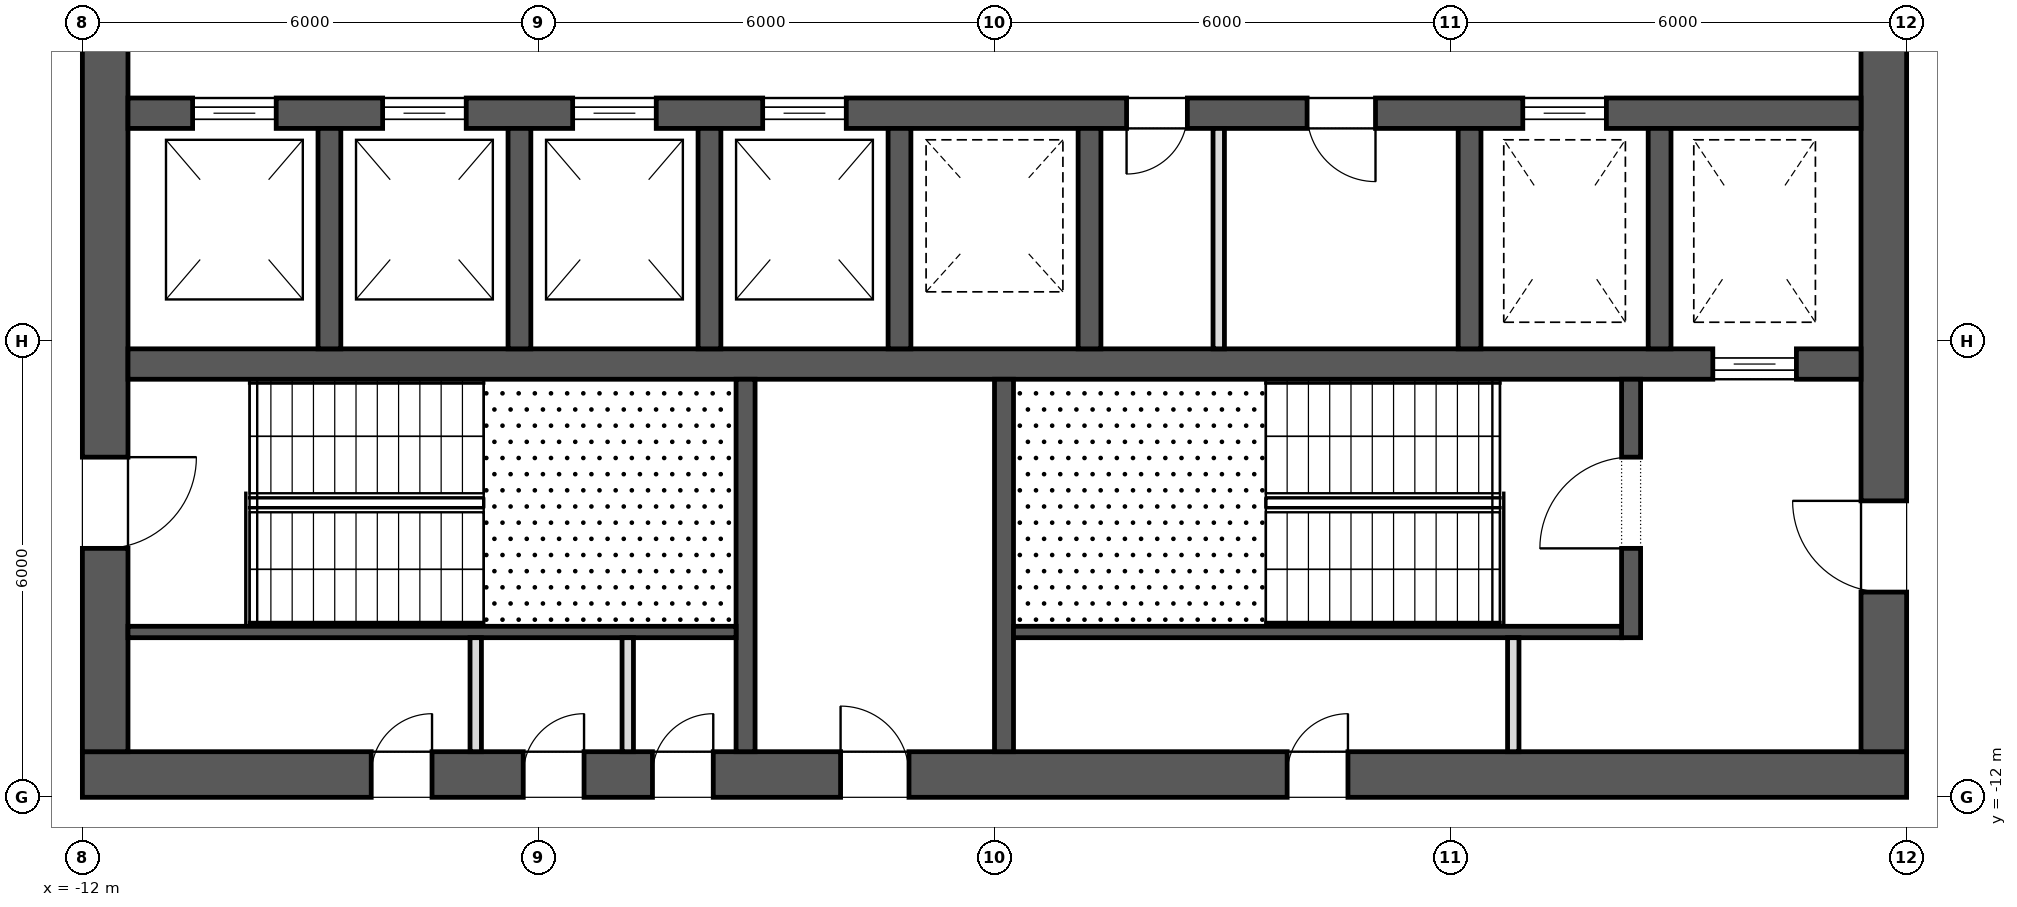
"""IFC4 building model, lengths in metres.
Left out: names, types, materials, properties, quantities, classifications, styles, units other than length and angle.
Written with IfcOpenShell. Run it as: python <this file> out.ifc"""

import sys

from ifc_helpers import new_model, si_unit, direction, frame, frame_2d, origin, place, context, subcontext, project, spatial, rectangle, extrude, element, fill, save


model = new_model("IFC4")
c1 = context("Model", 3, precision=1e-05, world=origin(), true_north=direction((0.0, 1.0)))
c2 = subcontext(c1, "Body", "Model", "MODEL_VIEW")
j1 = project(units=[si_unit("LENGTHUNIT", "METRE"), si_unit("PLANEANGLEUNIT", "RADIAN")], contexts=[c1])
p1 = place(None, origin())
s1 = spatial("IfcSite", under=j1, at=p1, CompositionType="ELEMENT")
p2 = place(p1, origin())
s2 = spatial("IfcBuilding", under=s1, at=p2, CompositionType="ELEMENT")
p3 = place(p2, frame((0.0, 0.0, 226.9)))
s3 = spatial("IfcBuildingStorey", under=s2, at=p3, CompositionType="ELEMENT", Elevation=226.9)
p4 = place(p3, frame((-12.0, -11.7, 0.0), z_axis=(0.0, 0.0, 1.0), x_axis=(1.0, 0.0, 0.0)))
e1 = element("IfcWall", 1, at=p4, inside=s3, PredefinedType="SHEAR", context=c2, shape_type="SweptSolid", body=[
    extrude(rectangle(XDim=24.0, YDim=0.6, at=frame_2d((12.0, 0.0))), origin(), (0.0, 0.0, 1.0), 4.0),
])
p5 = place(p4, frame((9.975, 0.0, 0.0)))
e2 = element("IfcOpeningElement", 2, at=p5, cuts=e1, PredefinedType="OPENING", context=c2, shape_type="SweptSolid", body=[
    extrude(rectangle(XDim=0.9, YDim=2.1, at=frame_2d((0.45, 1.05))), frame((0.0, 0.312, 0.0), z_axis=(0.0, -1.0, 0.0), x_axis=(1.0, 0.0, 0.0)), (0.0, 0.0, 1.0), 0.624),
])
p6 = place(p4, frame((3.8, 0.0, 0.0)))
e3 = element("IfcOpeningElement", 3, at=p6, cuts=e1, PredefinedType="OPENING", context=c2, shape_type="SweptSolid", body=[
    extrude(rectangle(XDim=0.8, YDim=2.1, at=frame_2d((0.4, 1.05))), frame((0.0, 0.312, 0.0), z_axis=(0.0, -1.0, 0.0), x_axis=(1.0, 0.0, 0.0)), (0.0, 0.0, 1.0), 0.624),
])
p7 = place(p4, frame((5.8, 0.0, 0.0)))
e4 = element("IfcOpeningElement", 4, at=p7, cuts=e1, PredefinedType="OPENING", context=c2, shape_type="SweptSolid", body=[
    extrude(rectangle(XDim=0.8, YDim=2.1, at=frame_2d((0.4, 1.05))), frame((0.0, 0.312, 0.0), z_axis=(0.0, -1.0, 0.0), x_axis=(1.0, 0.0, 0.0)), (0.0, 0.0, 1.0), 0.624),
])
p8 = place(p4, frame((7.5, 0.0, 0.0)))
e5 = element("IfcOpeningElement", 5, at=p8, cuts=e1, PredefinedType="OPENING", context=c2, shape_type="SweptSolid", body=[
    extrude(rectangle(XDim=0.8, YDim=2.1, at=frame_2d((0.4, 1.05))), frame((0.0, 0.312, 0.0), z_axis=(0.0, -1.0, 0.0), x_axis=(1.0, 0.0, 0.0)), (0.0, 0.0, 1.0), 0.624),
])
p9 = place(p4, frame((15.85, 0.0, 0.0)))
e6 = element("IfcOpeningElement", 6, at=p9, cuts=e1, PredefinedType="OPENING", context=c2, shape_type="SweptSolid", body=[
    extrude(rectangle(XDim=0.8, YDim=2.1, at=frame_2d((0.4, 1.05))), frame((0.0, 0.312, 0.0), z_axis=(0.0, -1.0, 0.0), x_axis=(1.0, 0.0, 0.0)), (0.0, 0.0, 1.0), 0.624),
])
p10 = place(p3, frame((11.7, -11.4, 0.0), z_axis=(0.0, 0.0, 1.0), x_axis=(0.0, 1.0, 0.0)))
e7 = element("IfcWall", 7, at=p10, inside=s3, PredefinedType="SHEAR", context=c2, shape_type="SweptSolid", body=[
    extrude(rectangle(XDim=22.8, YDim=0.6, at=frame_2d((11.4, 0.0))), origin(), (0.0, 0.0, 1.0), 4.0),
])
p11 = place(p10, frame((10.2, 0.0, 0.0)))
e8 = element("IfcOpeningElement", 8, at=p11, cuts=e7, PredefinedType="OPENING", context=c2, shape_type="SweptSolid", body=[
    extrude(rectangle(XDim=2.4, YDim=2.1, at=frame_2d((1.2, 1.05))), frame((0.0, 0.312, 0.0), z_axis=(0.0, -1.0, 0.0), x_axis=(1.0, 0.0, 0.0)), (0.0, 0.0, 1.0), 0.624),
])
p12 = place(p10, frame((19.5, 0.0, 0.0)))
e9 = element("IfcOpeningElement", 9, at=p12, cuts=e7, PredefinedType="OPENING", context=c2, shape_type="SweptSolid", body=[
    extrude(rectangle(XDim=1.2, YDim=2.1, at=frame_2d((0.6, 1.05))), frame((0.0, 0.312, 0.0), z_axis=(0.0, -1.0, 0.0), x_axis=(1.0, 0.0, 0.0)), (0.0, 0.0, 1.0), 0.624),
])
p13 = place(p10, frame((2.1, 0.0, 0.0)))
e10 = element("IfcOpeningElement", 10, at=p13, cuts=e7, PredefinedType="OPENING", context=c2, shape_type="SweptSolid", body=[
    extrude(rectangle(XDim=1.2, YDim=2.1, at=frame_2d((0.6, 1.05))), frame((0.0, 0.312, 0.0), z_axis=(0.0, -1.0, 0.0), x_axis=(1.0, 0.0, 0.0)), (0.0, 0.0, 1.0), 0.624),
])
p14 = place(p3, frame((-11.7, -11.4, 0.0), z_axis=(0.0, 0.0, 1.0), x_axis=(0.0, 1.0, 0.0)))
e11 = element("IfcWall", 11, at=p14, inside=s3, PredefinedType="SHEAR", context=c2, shape_type="SweptSolid", body=[
    extrude(rectangle(XDim=22.8, YDim=0.6, at=frame_2d((11.4, 0.0))), origin(), (0.0, 0.0, 1.0), 4.0),
])
p15 = place(p14, frame((10.2, 0.0, 0.0)))
e12 = element("IfcOpeningElement", 12, at=p15, cuts=e11, PredefinedType="OPENING", context=c2, shape_type="SweptSolid", body=[
    extrude(rectangle(XDim=2.4, YDim=2.1, at=frame_2d((1.2, 1.05))), frame((0.0, 0.312, 0.0), z_axis=(0.0, -1.0, 0.0), x_axis=(1.0, 0.0, 0.0)), (0.0, 0.0, 1.0), 0.624),
])
p16 = place(p14, frame((18.925, 0.0, 0.0)))
e13 = element("IfcOpeningElement", 13, at=p16, cuts=e11, PredefinedType="OPENING", context=c2, shape_type="SweptSolid", body=[
    extrude(rectangle(XDim=1.2, YDim=2.1, at=frame_2d((0.6, 1.05))), frame((0.0, 0.312, 0.0), z_axis=(0.0, -1.0, 0.0), x_axis=(1.0, 0.0, 0.0)), (0.0, 0.0, 1.0), 0.624),
])
p17 = place(p14, frame((2.675, 0.0, 0.0)))
e14 = element("IfcOpeningElement", 14, at=p17, cuts=e11, PredefinedType="OPENING", context=c2, shape_type="SweptSolid", body=[
    extrude(rectangle(XDim=1.2, YDim=2.1, at=frame_2d((0.6, 1.05))), frame((0.0, 0.312, 0.0), z_axis=(0.0, -1.0, 0.0), x_axis=(1.0, 0.0, 0.0)), (0.0, 0.0, 1.0), 0.624),
])
p18 = place(p3, frame((-11.4, -3.0, 0.0), z_axis=(0.0, 0.0, 1.0), x_axis=(1.0, 0.0, 0.0)))
e15 = element("IfcWall", 15, at=p18, inside=s3, PredefinedType="SHEAR", context=c2, shape_type="SweptSolid", body=[
    extrude(rectangle(XDim=22.8, YDim=0.4, at=frame_2d((11.4, 0.0))), origin(), (0.0, 0.0, 1.0), 4.0),
])
p19 = place(p18, frame((0.85, 0.0, 0.0)))
e16 = element("IfcOpeningElement", 16, at=p19, cuts=e15, PredefinedType="OPENING", context=c2, shape_type="SweptSolid", body=[
    extrude(rectangle(XDim=1.1, YDim=2.1, at=frame_2d((0.55, 1.05))), frame((0.0, 0.212, 0.0), z_axis=(0.0, -1.0, 0.0), x_axis=(1.0, 0.0, 0.0)), (0.0, 0.0, 1.0), 0.424),
])
p20 = place(p18, frame((3.35, 0.0, 0.0)))
e17 = element("IfcOpeningElement", 17, at=p20, cuts=e15, PredefinedType="OPENING", context=c2, shape_type="SweptSolid", body=[
    extrude(rectangle(XDim=1.1, YDim=2.1, at=frame_2d((0.55, 1.05))), frame((0.0, 0.212, 0.0), z_axis=(0.0, -1.0, 0.0), x_axis=(1.0, 0.0, 0.0)), (0.0, 0.0, 1.0), 0.424),
])
p21 = place(p18, frame((5.85, 0.0, 0.0)))
e18 = element("IfcOpeningElement", 18, at=p21, cuts=e15, PredefinedType="OPENING", context=c2, shape_type="SweptSolid", body=[
    extrude(rectangle(XDim=1.1, YDim=2.1, at=frame_2d((0.55, 1.05))), frame((0.0, 0.212, 0.0), z_axis=(0.0, -1.0, 0.0), x_axis=(1.0, 0.0, 0.0)), (0.0, 0.0, 1.0), 0.424),
])
p22 = place(p18, frame((8.35, 0.0, 0.0)))
e19 = element("IfcOpeningElement", 19, at=p22, cuts=e15, PredefinedType="OPENING", context=c2, shape_type="SweptSolid", body=[
    extrude(rectangle(XDim=1.1, YDim=2.1, at=frame_2d((0.55, 1.05))), frame((0.0, 0.212, 0.0), z_axis=(0.0, -1.0, 0.0), x_axis=(1.0, 0.0, 0.0)), (0.0, 0.0, 1.0), 0.424),
])
p23 = place(p18, frame((18.35, 0.0, 0.0)))
e20 = element("IfcOpeningElement", 20, at=p23, cuts=e15, PredefinedType="OPENING", context=c2, shape_type="SweptSolid", body=[
    extrude(rectangle(XDim=1.1, YDim=2.1, at=frame_2d((0.55, 1.05))), frame((0.0, 0.212, 0.0), z_axis=(0.0, -1.0, 0.0), x_axis=(1.0, 0.0, 0.0)), (0.0, 0.0, 1.0), 0.424),
])
p24 = place(p18, frame((13.137, 0.0, 0.0)))
e21 = element("IfcOpeningElement", 21, at=p24, cuts=e15, PredefinedType="OPENING", context=c2, shape_type="SweptSolid", body=[
    extrude(rectangle(XDim=0.8, YDim=2.1, at=frame_2d((0.4, 1.05))), frame((0.0, 0.212, 0.0), z_axis=(0.0, -1.0, 0.0), x_axis=(1.0, 0.0, 0.0)), (0.0, 0.0, 1.0), 0.424),
])
p25 = place(p18, frame((15.512, 0.0, 0.0)))
e22 = element("IfcOpeningElement", 22, at=p25, cuts=e15, PredefinedType="OPENING", context=c2, shape_type="SweptSolid", body=[
    extrude(rectangle(XDim=0.9, YDim=2.1, at=frame_2d((0.45, 1.05))), frame((0.0, 0.212, 0.0), z_axis=(0.0, -1.0, 0.0), x_axis=(1.0, 0.0, 0.0)), (0.0, 0.0, 1.0), 0.424),
])
p26 = place(p3, frame((-11.4, -6.3, 0.0), z_axis=(0.0, 0.0, 1.0), x_axis=(1.0, 0.0, 0.0)))
e23 = element("IfcWall", 23, at=p26, inside=s3, PredefinedType="SHEAR", context=c2, shape_type="SweptSolid", body=[
    extrude(rectangle(XDim=22.8, YDim=0.4, at=frame_2d((11.4, 0.0))), origin(), (0.0, 0.0, 1.0), 4.0),
])
p27 = place(p26, frame((20.85, 0.0, 0.0)))
e24 = element("IfcOpeningElement", 24, at=p27, cuts=e23, PredefinedType="OPENING", context=c2, shape_type="SweptSolid", body=[
    extrude(rectangle(XDim=1.1, YDim=2.1, at=frame_2d((0.55, 1.05))), frame((0.0, 0.212, 0.0), z_axis=(0.0, -1.0, 0.0), x_axis=(1.0, 0.0, 0.0)), (0.0, 0.0, 1.0), 0.424),
])
for number, where, z_axis, x_axis in (
    (25, (-8.75, -6.1, 0.0), (0.0, 0.0, 1.0), (0.0, 1.0, 0.0)),
    (26, (-6.25, -6.1, 0.0), (0.0, 0.0, 1.0), (0.0, 1.0, 0.0)),
    (27, (-3.75, -6.1, 0.0), (0.0, 0.0, 1.0), (0.0, 1.0, 0.0)),
    (28, (-1.25, -6.1, 0.0), (0.0, 0.0, 1.0), (0.0, 1.0, 0.0)),
    (29, (1.25, -6.1, 0.0), (0.0, 0.0, 1.0), (0.0, 1.0, 0.0)),
    (30, (6.25, -6.1, 0.0), (0.0, 0.0, 1.0), (0.0, 1.0, 0.0)),
    (31, (8.75, -6.1, 0.0), (0.0, 0.0, 1.0), (0.0, 1.0, 0.0)),
):
    element("IfcWall", number, at=place(p3, frame(where, z_axis=z_axis, x_axis=x_axis)), inside=s3, PredefinedType="SHEAR", context=c2, shape_type="SweptSolid", body=[
        extrude(rectangle(XDim=2.9, YDim=0.3, at=frame_2d((1.45, 0.0))), origin(), (0.0, 0.0, 1.0), 4.0),
    ])
for number, where, z_axis, x_axis in (
    (32, (-3.275, -11.4, 0.0), (0.0, 0.0, 1.0), (0.0, 1.0, 0.0)),
    (33, (0.125, -11.4, 0.0), (0.0, 0.0, 1.0), (0.0, 1.0, 0.0)),
):
    element("IfcWall", number, at=place(p3, frame(where, z_axis=z_axis, x_axis=x_axis)), inside=s3, PredefinedType="SHEAR", context=c2, shape_type="SweptSolid", body=[
        extrude(rectangle(XDim=4.9, YDim=0.25, at=frame_2d((2.45, 0.0))), origin(), (0.0, 0.0, 1.0), 3.7),
    ])
p28 = place(p3, frame((8.375, -9.9, 0.0), z_axis=(0.0, 0.0, 1.0), x_axis=(0.0, 1.0, 0.0)))
e34 = element("IfcWall", 34, at=p28, inside=s3, PredefinedType="SHEAR", context=c2, shape_type="SweptSolid", body=[
    extrude(rectangle(XDim=3.4, YDim=0.25, at=frame_2d((1.7, 0.0))), origin(), (0.0, 0.0, 1.0), 3.7),
])
p29 = place(p28, frame((1.175, 0.0, 0.0)))
e35 = element("IfcOpeningElement", 35, at=p29, cuts=e34, PredefinedType="OPENING", context=c2, shape_type="SweptSolid", body=[
    extrude(rectangle(XDim=1.2, YDim=2.1, at=frame_2d((0.6, 1.05))), frame((0.0, 0.137, 0.0), z_axis=(0.0, -1.0, 0.0), x_axis=(1.0, 0.0, 0.0)), (0.0, 0.0, 1.0), 0.274),
])
for number, where, z_axis, x_axis in (
    (36, (-11.4, -9.825, 0.0), (0.0, 0.0, 1.0), (1.0, 0.0, 0.0)),
    (37, (0.25, -9.825, 0.0), (0.0, 0.0, 1.0), (1.0, 0.0, 0.0)),
):
    element("IfcWall", number, at=place(p3, frame(where, z_axis=z_axis, x_axis=x_axis)), inside=s3, PredefinedType="SHEAR", context=c2, shape_type="SweptSolid", body=[
        extrude(rectangle(XDim=8.0, YDim=0.15, at=frame_2d((4.0, 0.0))), origin(), (0.0, 0.0, 1.0), 3.7),
    ])
for number, where, z_axis, x_axis in (
    (38, (-6.825, -11.4, 0.0), (0.0, 0.0, 1.0), (0.0, 1.0, 0.0)),
    (39, (-4.825, -11.4, 0.0), (0.0, 0.0, 1.0), (0.0, 1.0, 0.0)),
    (40, (6.825, -11.4, 0.0), (0.0, 0.0, 1.0), (0.0, 1.0, 0.0)),
):
    element("IfcWall", number, at=place(p3, frame(where, z_axis=z_axis, x_axis=x_axis)), inside=s3, PredefinedType="PARTITIONING", context=c2, shape_type="SweptSolid", body=[
        extrude(rectangle(XDim=1.5, YDim=0.15, at=frame_2d((0.75, 0.0))), origin(), (0.0, 0.0, 1.0), 3.7),
    ])
p30 = place(p3, frame((2.95, -6.1, 0.0), z_axis=(0.0, 0.0, 1.0), x_axis=(0.0, 1.0, 0.0)))
e41 = element("IfcWall", 41, at=p30, inside=s3, PredefinedType="PARTITIONING", context=c2, shape_type="SweptSolid", body=[
    extrude(rectangle(XDim=2.9, YDim=0.15, at=frame_2d((1.45, 0.0))), origin(), (0.0, 0.0, 1.0), 3.7),
])
p31 = place(p27, origin())
e42 = element("IfcDoor", 42, at=p31, inside=s3, OperationType="SLIDING_TO_LEFT", PredefinedType="DOOR", context=c2, shape_type="SweptSolid", body=[
    extrude(rectangle(XDim=1.1, YDim=2.1, at=frame_2d((0.55, 1.05))), frame((0.0, 0.025, 0.0), z_axis=(0.0, -1.0, 0.0), x_axis=(1.0, 0.0, 0.0)), (0.0, 0.0, 1.0), 0.05),
])
fill(e24, e42)
p32 = place(p19, origin())
e43 = element("IfcDoor", 43, at=p32, inside=s3, OperationType="SLIDING_TO_LEFT", PredefinedType="DOOR", context=c2, shape_type="SweptSolid", body=[
    extrude(rectangle(XDim=1.1, YDim=2.1, at=frame_2d((0.55, 1.05))), frame((0.0, 0.025, 0.0), z_axis=(0.0, -1.0, 0.0), x_axis=(1.0, 0.0, 0.0)), (0.0, 0.0, 1.0), 0.05),
])
fill(e16, e43)
p33 = place(p20, origin())
e44 = element("IfcDoor", 44, at=p33, inside=s3, OperationType="SLIDING_TO_LEFT", PredefinedType="DOOR", context=c2, shape_type="SweptSolid", body=[
    extrude(rectangle(XDim=1.1, YDim=2.1, at=frame_2d((0.55, 1.05))), frame((0.0, 0.025, 0.0), z_axis=(0.0, -1.0, 0.0), x_axis=(1.0, 0.0, 0.0)), (0.0, 0.0, 1.0), 0.05),
])
fill(e17, e44)
p34 = place(p21, origin())
e45 = element("IfcDoor", 45, at=p34, inside=s3, OperationType="SLIDING_TO_LEFT", PredefinedType="DOOR", context=c2, shape_type="SweptSolid", body=[
    extrude(rectangle(XDim=1.1, YDim=2.1, at=frame_2d((0.55, 1.05))), frame((0.0, 0.025, 0.0), z_axis=(0.0, -1.0, 0.0), x_axis=(1.0, 0.0, 0.0)), (0.0, 0.0, 1.0), 0.05),
])
fill(e18, e45)
p35 = place(p22, origin())
e46 = element("IfcDoor", 46, at=p35, inside=s3, OperationType="SLIDING_TO_LEFT", PredefinedType="DOOR", context=c2, shape_type="SweptSolid", body=[
    extrude(rectangle(XDim=1.1, YDim=2.1, at=frame_2d((0.55, 1.05))), frame((0.0, 0.025, 0.0), z_axis=(0.0, -1.0, 0.0), x_axis=(1.0, 0.0, 0.0)), (0.0, 0.0, 1.0), 0.05),
])
fill(e19, e46)
p36 = place(p23, origin())
e47 = element("IfcDoor", 47, at=p36, inside=s3, OperationType="SLIDING_TO_LEFT", PredefinedType="DOOR", context=c2, shape_type="SweptSolid", body=[
    extrude(rectangle(XDim=1.1, YDim=2.1, at=frame_2d((0.55, 1.05))), frame((0.0, 0.025, 0.0), z_axis=(0.0, -1.0, 0.0), x_axis=(1.0, 0.0, 0.0)), (0.0, 0.0, 1.0), 0.05),
])
fill(e20, e47)
p37 = place(p17, frame((1.2, 0.0, 0.0), z_axis=(0.0, 0.0, 1.0), x_axis=(-1.0, 0.0, 0.0)))
e48 = element("IfcDoor", 48, at=p37, inside=s3, OperationType="SINGLE_SWING_RIGHT", PredefinedType="DOOR", context=c2, shape_type="SweptSolid", body=[
    extrude(rectangle(XDim=1.2, YDim=2.1, at=frame_2d((0.6, 1.05))), frame((0.0, 0.025, 0.0), z_axis=(0.0, -1.0, 0.0), x_axis=(1.0, 0.0, 0.0)), (0.0, 0.0, 1.0), 0.05),
])
fill(e14, e48)
p38 = place(p29, origin())
e49 = element("IfcDoor", 49, at=p38, inside=s3, OperationType="SINGLE_SWING_RIGHT", PredefinedType="DOOR", context=c2, shape_type="SweptSolid", body=[
    extrude(rectangle(XDim=1.2, YDim=2.1, at=frame_2d((0.6, 1.05))), frame((0.0, 0.025, 0.0), z_axis=(0.0, -1.0, 0.0), x_axis=(1.0, 0.0, 0.0)), (0.0, 0.0, 1.0), 0.05),
])
fill(e35, e49)
p39 = place(p13, origin())
e50 = element("IfcDoor", 50, at=p39, inside=s3, OperationType="SINGLE_SWING_LEFT", PredefinedType="DOOR", context=c2, shape_type="SweptSolid", body=[
    extrude(rectangle(XDim=1.2, YDim=2.1, at=frame_2d((0.6, 1.05))), frame((0.0, 0.025, 0.0), z_axis=(0.0, -1.0, 0.0), x_axis=(1.0, 0.0, 0.0)), (0.0, 0.0, 1.0), 0.05),
])
fill(e10, e50)
p40 = place(p5, origin())
e51 = element("IfcDoor", 51, at=p40, inside=s3, OperationType="SINGLE_SWING_RIGHT", PredefinedType="DOOR", context=c2, shape_type="SweptSolid", body=[
    extrude(rectangle(XDim=0.9, YDim=2.1, at=frame_2d((0.45, 1.05))), frame((0.0, 0.025, 0.0), z_axis=(0.0, -1.0, 0.0), x_axis=(1.0, 0.0, 0.0)), (0.0, 0.0, 1.0), 0.05),
])
fill(e2, e51)
p41 = place(p6, origin())
e52 = element("IfcDoor", 52, at=p41, inside=s3, OperationType="SINGLE_SWING_LEFT", PredefinedType="DOOR", context=c2, shape_type="SweptSolid", body=[
    extrude(rectangle(XDim=0.8, YDim=2.1, at=frame_2d((0.4, 1.05))), frame((0.0, 0.025, 0.0), z_axis=(0.0, -1.0, 0.0), x_axis=(1.0, 0.0, 0.0)), (0.0, 0.0, 1.0), 0.05),
])
fill(e3, e52)
p42 = place(p7, origin())
e53 = element("IfcDoor", 53, at=p42, inside=s3, OperationType="SINGLE_SWING_LEFT", PredefinedType="DOOR", context=c2, shape_type="SweptSolid", body=[
    extrude(rectangle(XDim=0.8, YDim=2.1, at=frame_2d((0.4, 1.05))), frame((0.0, 0.025, 0.0), z_axis=(0.0, -1.0, 0.0), x_axis=(1.0, 0.0, 0.0)), (0.0, 0.0, 1.0), 0.05),
])
fill(e4, e53)
p43 = place(p8, origin())
e54 = element("IfcDoor", 54, at=p43, inside=s3, OperationType="SINGLE_SWING_LEFT", PredefinedType="DOOR", context=c2, shape_type="SweptSolid", body=[
    extrude(rectangle(XDim=0.8, YDim=2.1, at=frame_2d((0.4, 1.05))), frame((0.0, 0.025, 0.0), z_axis=(0.0, -1.0, 0.0), x_axis=(1.0, 0.0, 0.0)), (0.0, 0.0, 1.0), 0.05),
])
fill(e5, e54)
p44 = place(p9, origin())
e55 = element("IfcDoor", 55, at=p44, inside=s3, OperationType="SINGLE_SWING_LEFT", PredefinedType="DOOR", context=c2, shape_type="SweptSolid", body=[
    extrude(rectangle(XDim=0.8, YDim=2.1, at=frame_2d((0.4, 1.05))), frame((0.0, 0.025, 0.0), z_axis=(0.0, -1.0, 0.0), x_axis=(1.0, 0.0, 0.0)), (0.0, 0.0, 1.0), 0.05),
])
fill(e6, e55)
p45 = place(p24, frame((0.8, 0.0, 0.0), z_axis=(0.0, 0.0, 1.0), x_axis=(-1.0, 0.0, 0.0)))
e56 = element("IfcDoor", 56, at=p45, inside=s3, OperationType="SINGLE_SWING_LEFT", PredefinedType="DOOR", context=c2, shape_type="SweptSolid", body=[
    extrude(rectangle(XDim=0.8, YDim=2.1, at=frame_2d((0.4, 1.05))), frame((0.0, 0.025, 0.0), z_axis=(0.0, -1.0, 0.0), x_axis=(1.0, 0.0, 0.0)), (0.0, 0.0, 1.0), 0.05),
])
fill(e21, e56)
p46 = place(p25, frame((0.9, 0.0, 0.0), z_axis=(0.0, 0.0, 1.0), x_axis=(-1.0, 0.0, 0.0)))
e57 = element("IfcDoor", 57, at=p46, inside=s3, OperationType="SINGLE_SWING_RIGHT", PredefinedType="DOOR", context=c2, shape_type="SweptSolid", body=[
    extrude(rectangle(XDim=0.9, YDim=2.1, at=frame_2d((0.45, 1.05))), frame((0.0, 0.025, 0.0), z_axis=(0.0, -1.0, 0.0), x_axis=(1.0, 0.0, 0.0)), (0.0, 0.0, 1.0), 0.05),
])
fill(e22, e57)
save(model, sys.argv[1])
